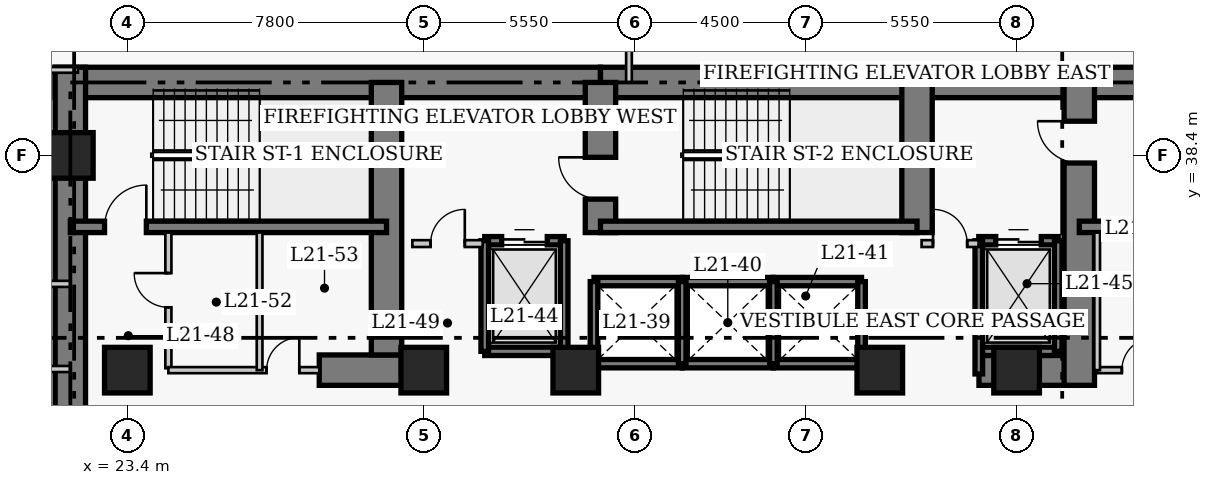
"""IFC4 building model, lengths in metres.
Left out: names, types, materials, properties, quantities, classifications, styles, units other than length and angle.
Written with IfcOpenShell. Run it as: python <this file> out.ifc"""

import sys

from ifc_helpers import new_model, si_unit, direction, frame, frame_2d, origin, origin_2d, place, context, subcontext, project, spatial, rectangle, extrude, element, fill, save


model = new_model("IFC4")
c1 = context("Model", 3, precision=1e-05, world=origin(), true_north=direction((0.0, 1.0)))
c2 = subcontext(c1, "Body", "Model", "MODEL_VIEW")
j1 = project(units=[si_unit("LENGTHUNIT", "METRE"), si_unit("PLANEANGLEUNIT", "RADIAN")], contexts=[c1])
p1 = place(None, origin())
s1 = spatial("IfcSite", under=j1, at=p1, CompositionType="ELEMENT")
p2 = place(p1, origin())
s2 = spatial("IfcBuilding", under=s1, at=p2, CompositionType="ELEMENT")
p3 = place(p2, frame((0.0, 0.0, 88.0)))
s3 = spatial("IfcBuildingStorey", under=s2, at=p3, CompositionType="ELEMENT", Elevation=88.0)
p4 = place(p3, frame((21.5, 40.32, 0.0), z_axis=(0.0, 0.0, 1.0), x_axis=(1.0, 0.0, 0.0)))
e1 = element("IfcWall", 1, at=p4, inside=s3, PredefinedType="SHEAR", context=c2, shape_type="SweptSolid", body=[
    extrude(rectangle(XDim=14.35, YDim=0.8, at=frame_2d((7.175, 0.0))), origin(), (0.0, 0.0, 1.0), 3.8),
])
p5 = place(p3, frame((35.85, 40.32, 0.0), z_axis=(0.0, 0.0, 1.0), x_axis=(1.0, 0.0, 0.0)))
e2 = element("IfcWall", 2, at=p5, inside=s3, PredefinedType="SHEAR", context=c2, shape_type="SweptSolid", body=[
    extrude(rectangle(XDim=12.6, YDim=0.8, at=frame_2d((6.3, 0.0))), origin(), (0.0, 0.0, 1.0), 3.8),
])
p6 = place(p3, frame((48.45, 40.32, 0.0), z_axis=(0.0, 0.0, 1.0), x_axis=(1.0, 0.0, 0.0)))
e3 = element("IfcWall", 3, at=p6, inside=s3, PredefinedType="SHEAR", context=c2, shape_type="SweptSolid", body=[
    extrude(rectangle(XDim=8.87, YDim=0.8, at=frame_2d((4.435, 0.0))), origin(), (0.0, 0.0, 1.0), 3.8),
])
p7 = place(p3, frame((21.9, 27.05, 0.0), z_axis=(0.0, 0.0, 1.0), x_axis=(0.0, 1.0, 0.0)))
e4 = element("IfcWall", 4, at=p7, inside=s3, PredefinedType="SHEAR", context=c2, shape_type="SweptSolid", body=[
    extrude(rectangle(XDim=13.67, YDim=0.8, at=frame_2d((6.835, 0.0))), origin(), (0.0, 0.0, 1.0), 3.8),
])
p8 = place(p3, frame((28.45, 32.75, 0.0), z_axis=(0.0, 0.0, 1.0), x_axis=(1.0, 0.0, 0.0)))
e5 = element("IfcWall", 5, at=p8, inside=s3, PredefinedType="SHEAR", context=c2, shape_type="SweptSolid", body=[
    extrude(rectangle(XDim=2.4, YDim=0.8, at=frame_2d((1.2, 0.0))), origin(), (0.0, 0.0, 1.0), 3.8),
])
p9 = place(p3, frame((45.81, 32.75, 0.0), z_axis=(0.0, 0.0, 1.0), x_axis=(1.0, 0.0, 0.0)))
e6 = element("IfcWall", 6, at=p9, inside=s3, PredefinedType="SHEAR", context=c2, shape_type="SweptSolid", body=[
    extrude(rectangle(XDim=2.64, YDim=0.8, at=frame_2d((1.32, 0.0))), origin(), (0.0, 0.0, 1.0), 3.8),
])
p10 = place(p3, frame((30.22, 33.15, 0.0), z_axis=(0.0, 0.0, 1.0), x_axis=(0.0, 1.0, 0.0)))
e7 = element("IfcWall", 7, at=p10, inside=s3, PredefinedType="SHEAR", context=c2, shape_type="SweptSolid", body=[
    extrude(rectangle(XDim=7.17, YDim=0.8, at=frame_2d((3.585, 0.0))), origin(), (0.0, 0.0, 1.0), 3.8),
])
p11 = place(p3, frame((35.85, 36.37, 0.0), z_axis=(0.0, 0.0, 1.0), x_axis=(0.0, 1.0, 0.0)))
e8 = element("IfcWall", 8, at=p11, inside=s3, PredefinedType="SHEAR", context=c2, shape_type="SweptSolid", body=[
    extrude(rectangle(XDim=3.95, YDim=0.8, at=frame_2d((1.975, 0.0))), origin(), (0.0, 0.0, 1.0), 3.8),
])
p12 = place(p11, frame((0.88, 0.0, 0.0)))
e9 = element("IfcOpeningElement", 9, at=p12, cuts=e8, PredefinedType="OPENING", context=c2, shape_type="SweptSolid", body=[
    extrude(rectangle(XDim=1.1, YDim=2.15, at=frame_2d((0.55, 1.075))), frame((0.0, 0.41, 0.0), z_axis=(0.0, -1.0, 0.0), x_axis=(1.0, 0.0, 0.0)), (0.0, 0.0, 1.0), 0.82),
])
p13 = place(p3, frame((44.18, 36.37, 0.0), z_axis=(0.0, 0.0, 1.0), x_axis=(0.0, 1.0, 0.0)))
e10 = element("IfcWall", 10, at=p13, inside=s3, PredefinedType="SHEAR", context=c2, shape_type="SweptSolid", body=[
    extrude(rectangle(XDim=3.95, YDim=0.8, at=frame_2d((1.975, 0.0))), origin(), (0.0, 0.0, 1.0), 3.8),
])
p14 = place(p3, frame((48.45, 32.35, 0.0), z_axis=(0.0, 0.0, 1.0), x_axis=(0.0, 1.0, 0.0)))
e11 = element("IfcWall", 11, at=p14, inside=s3, PredefinedType="SHEAR", context=c2, shape_type="SweptSolid", body=[
    extrude(rectangle(XDim=7.97, YDim=0.8, at=frame_2d((3.985, 0.0))), origin(), (0.0, 0.0, 1.0), 3.8),
])
p15 = place(p14, frame((5.85, 0.0, 0.0)))
e12 = element("IfcOpeningElement", 12, at=p15, cuts=e11, PredefinedType="OPENING", context=c2, shape_type="SweptSolid", body=[
    extrude(rectangle(XDim=1.1, YDim=2.15, at=frame_2d((0.55, 1.075))), frame((0.0, 0.41, 0.0), z_axis=(0.0, -1.0, 0.0), x_axis=(1.0, 0.0, 0.0)), (0.0, 0.0, 1.0), 0.82),
])
p16 = place(p3, frame((21.9, 36.52, 0.0), z_axis=(0.0, 0.0, 1.0), x_axis=(1.0, 0.0, 0.0)))
e13 = element("IfcWall", 13, at=p16, inside=s3, PredefinedType="SHEAR", context=c2, shape_type="SweptSolid", body=[
    extrude(rectangle(XDim=8.32, YDim=0.3, at=frame_2d((4.16, 0.0))), origin(), (0.0, 0.0, 1.0), 3.8),
])
p17 = place(p16, frame((0.9, 0.0, 0.0)))
e14 = element("IfcOpeningElement", 14, at=p17, cuts=e13, PredefinedType="OPENING", context=c2, shape_type="SweptSolid", body=[
    extrude(rectangle(XDim=1.1, YDim=2.15, at=frame_2d((0.55, 1.075))), frame((0.0, 0.16, 0.0), z_axis=(0.0, -1.0, 0.0), x_axis=(1.0, 0.0, 0.0)), (0.0, 0.0, 1.0), 0.32),
])
p18 = place(p3, frame((35.85, 36.52, 0.0), z_axis=(0.0, 0.0, 1.0), x_axis=(1.0, 0.0, 0.0)))
e15 = element("IfcWall", 15, at=p18, inside=s3, PredefinedType="SHEAR", context=c2, shape_type="SweptSolid", body=[
    extrude(rectangle(XDim=8.33, YDim=0.3, at=frame_2d((4.165, 0.0))), origin(), (0.0, 0.0, 1.0), 3.8),
])
p19 = place(p3, frame((48.45, 36.52, 0.0), z_axis=(0.0, 0.0, 1.0), x_axis=(1.0, 0.0, 0.0)))
e16 = element("IfcWall", 16, at=p19, inside=s3, PredefinedType="SHEAR", context=c2, shape_type="SweptSolid", body=[
    extrude(rectangle(XDim=8.47, YDim=0.3, at=frame_2d((4.235, 0.0))), origin(), (0.0, 0.0, 1.0), 3.8),
])
for number, where, z_axis, x_axis in (
    (17, (21.9, 38.4, 0.0), (0.0, 0.0, 1.0), (1.0, 0.0, 0.0)),
    (18, (23.4, 32.75, 0.0), (0.0, 0.0, 1.0), (1.0, 0.0, 0.0)),
    (19, (31.2, 32.75, 0.0), (0.0, 0.0, 1.0), (1.0, 0.0, 0.0)),
    (20, (35.2, 32.75, 0.0), (0.0, 0.0, 1.0), (1.0, 0.0, 0.0)),
    (21, (43.2, 32.75, 0.0), (0.0, 0.0, 1.0), (1.0, 0.0, 0.0)),
    (22, (46.8, 32.75, 0.0), (0.0, 0.0, 1.0), (1.0, 0.0, 0.0)),
):
    element("IfcColumn", number, at=place(p3, frame(where, z_axis=z_axis, x_axis=x_axis)), inside=s3, PredefinedType="COLUMN", context=c2, shape_type="SweptSolid", body=[
        extrude(rectangle(XDim=1.2, YDim=1.2, at=origin_2d()), origin(), (0.0, 0.0, 1.0), 3.8),
    ])
for number, where, z_axis, x_axis in (
    (23, (35.68, 35.08, 0.0), (0.0, 0.0, 1.0), (1.0, 0.0, 0.0)),
    (24, (35.68, 32.92, 0.0), (0.0, 0.0, 1.0), (1.0, 0.0, 0.0)),
):
    element("IfcWall", number, at=place(p3, frame(where, z_axis=z_axis, x_axis=x_axis)), inside=s3, PredefinedType="SHEAR", context=c2, shape_type="SweptSolid", body=[
        extrude(rectangle(XDim=2.32, YDim=0.22, at=frame_2d((1.16, 0.0))), origin(), (0.0, 0.0, 1.0), 3.8),
    ])
p20 = place(p3, frame((35.68, 32.92, 0.0), z_axis=(0.0, 0.0, 1.0), x_axis=(0.0, 1.0, 0.0)))
e25 = element("IfcWall", 25, at=p20, inside=s3, PredefinedType="SHEAR", context=c2, shape_type="SweptSolid", body=[
    extrude(rectangle(XDim=2.16, YDim=0.2, at=frame_2d((1.08, 0.0))), origin(), (0.0, 0.0, 1.0), 3.8),
])
for number, where, z_axis, x_axis in (
    (26, (38.0, 35.08, 0.0), (0.0, 0.0, 1.0), (1.0, 0.0, 0.0)),
    (27, (38.0, 32.92, 0.0), (0.0, 0.0, 1.0), (1.0, 0.0, 0.0)),
):
    element("IfcWall", number, at=place(p3, frame(where, z_axis=z_axis, x_axis=x_axis)), inside=s3, PredefinedType="SHEAR", context=c2, shape_type="SweptSolid", body=[
        extrude(rectangle(XDim=2.4, YDim=0.22, at=frame_2d((1.2, 0.0))), origin(), (0.0, 0.0, 1.0), 3.8),
    ])
p21 = place(p3, frame((38.0, 32.92, 0.0), z_axis=(0.0, 0.0, 1.0), x_axis=(0.0, 1.0, 0.0)))
e28 = element("IfcWall", 28, at=p21, inside=s3, PredefinedType="SHEAR", context=c2, shape_type="SweptSolid", body=[
    extrude(rectangle(XDim=2.16, YDim=0.2, at=frame_2d((1.08, 0.0))), origin(), (0.0, 0.0, 1.0), 3.8),
])
for number, where, z_axis, x_axis in (
    (29, (40.4, 35.08, 0.0), (0.0, 0.0, 1.0), (1.0, 0.0, 0.0)),
    (30, (40.4, 32.92, 0.0), (0.0, 0.0, 1.0), (1.0, 0.0, 0.0)),
):
    element("IfcWall", number, at=place(p3, frame(where, z_axis=z_axis, x_axis=x_axis)), inside=s3, PredefinedType="SHEAR", context=c2, shape_type="SweptSolid", body=[
        extrude(rectangle(XDim=2.32, YDim=0.22, at=frame_2d((1.16, 0.0))), origin(), (0.0, 0.0, 1.0), 3.8),
    ])
for number, where, z_axis, x_axis in (
    (31, (40.4, 32.92, 0.0), (0.0, 0.0, 1.0), (0.0, 1.0, 0.0)),
    (32, (42.72, 32.92, 0.0), (0.0, 0.0, 1.0), (0.0, 1.0, 0.0)),
):
    element("IfcWall", number, at=place(p3, frame(where, z_axis=z_axis, x_axis=x_axis)), inside=s3, PredefinedType="SHEAR", context=c2, shape_type="SweptSolid", body=[
        extrude(rectangle(XDim=2.16, YDim=0.2, at=frame_2d((1.08, 0.0))), origin(), (0.0, 0.0, 1.0), 3.8),
    ])
p22 = place(p3, frame((32.805, 36.155, 0.0), z_axis=(0.0, 0.0, 1.0), x_axis=(1.0, 0.0, 0.0)))
e33 = element("IfcWall", 33, at=p22, inside=s3, PredefinedType="SHEAR", context=c2, shape_type="SweptSolid", body=[
    extrude(rectangle(XDim=2.09, YDim=0.22, at=frame_2d((1.045, 0.0))), origin(), (0.0, 0.0, 1.0), 3.8),
])
p23 = place(p22, frame((0.445, 0.0, 0.0)))
e34 = element("IfcOpeningElement", 34, at=p23, cuts=e33, PredefinedType="OPENING", context=c2, shape_type="SweptSolid", body=[
    extrude(rectangle(XDim=1.2, YDim=2.15, at=frame_2d((0.6, 1.075))), frame((0.0, 0.12, 0.0), z_axis=(0.0, -1.0, 0.0), x_axis=(1.0, 0.0, 0.0)), (0.0, 0.0, 1.0), 0.24),
])
p24 = place(p3, frame((32.805, 33.245, 0.0), z_axis=(0.0, 0.0, 1.0), x_axis=(1.0, 0.0, 0.0)))
e35 = element("IfcWall", 35, at=p24, inside=s3, PredefinedType="SHEAR", context=c2, shape_type="SweptSolid", body=[
    extrude(rectangle(XDim=2.09, YDim=0.22, at=frame_2d((1.045, 0.0))), origin(), (0.0, 0.0, 1.0), 3.8),
])
for number, where, z_axis, x_axis in (
    (36, (32.805, 33.245, 0.0), (0.0, 0.0, 1.0), (0.0, 1.0, 0.0)),
    (37, (34.895, 33.245, 0.0), (0.0, 0.0, 1.0), (0.0, 1.0, 0.0)),
):
    element("IfcWall", number, at=place(p3, frame(where, z_axis=z_axis, x_axis=x_axis)), inside=s3, PredefinedType="SHEAR", context=c2, shape_type="SweptSolid", body=[
        extrude(rectangle(XDim=2.91, YDim=0.2, at=frame_2d((1.455, 0.0))), origin(), (0.0, 0.0, 1.0), 3.8),
    ])
p25 = place(p3, frame((45.805, 36.155, 0.0), z_axis=(0.0, 0.0, 1.0), x_axis=(1.0, 0.0, 0.0)))
e38 = element("IfcWall", 38, at=p25, inside=s3, PredefinedType="SHEAR", context=c2, shape_type="SweptSolid", body=[
    extrude(rectangle(XDim=2.09, YDim=0.22, at=frame_2d((1.045, 0.0))), origin(), (0.0, 0.0, 1.0), 3.8),
])
p26 = place(p25, frame((0.445, 0.0, 0.0)))
e39 = element("IfcOpeningElement", 39, at=p26, cuts=e38, PredefinedType="OPENING", context=c2, shape_type="SweptSolid", body=[
    extrude(rectangle(XDim=1.2, YDim=2.15, at=frame_2d((0.6, 1.075))), frame((0.0, 0.12, 0.0), z_axis=(0.0, -1.0, 0.0), x_axis=(1.0, 0.0, 0.0)), (0.0, 0.0, 1.0), 0.24),
])
p27 = place(p3, frame((45.805, 33.245, 0.0), z_axis=(0.0, 0.0, 1.0), x_axis=(1.0, 0.0, 0.0)))
e40 = element("IfcWall", 40, at=p27, inside=s3, PredefinedType="SHEAR", context=c2, shape_type="SweptSolid", body=[
    extrude(rectangle(XDim=2.09, YDim=0.22, at=frame_2d((1.045, 0.0))), origin(), (0.0, 0.0, 1.0), 3.8),
])
p28 = place(p3, frame((45.805, 32.65, 0.0), z_axis=(0.0, 0.0, 1.0), x_axis=(0.0, 1.0, 0.0)))
e41 = element("IfcWall", 41, at=p28, inside=s3, PredefinedType="SHEAR", context=c2, shape_type="SweptSolid", body=[
    extrude(rectangle(XDim=3.505, YDim=0.2, at=frame_2d((1.752, 0.0))), origin(), (0.0, 0.0, 1.0), 3.8),
])
p29 = place(p3, frame((47.895, 33.245, 0.0), z_axis=(0.0, 0.0, 1.0), x_axis=(0.0, 1.0, 0.0)))
e42 = element("IfcWall", 42, at=p29, inside=s3, PredefinedType="SHEAR", context=c2, shape_type="SweptSolid", body=[
    extrude(rectangle(XDim=2.91, YDim=0.2, at=frame_2d((1.455, 0.0))), origin(), (0.0, 0.0, 1.0), 3.8),
])
p30 = place(p3, frame((30.9, 36.08, 0.0), z_axis=(0.0, 0.0, 1.0), x_axis=(1.0, 0.0, 0.0)))
e43 = element("IfcWall", 43, at=p30, inside=s3, PredefinedType="PARTITIONING", context=c2, shape_type="SweptSolid", body=[
    extrude(rectangle(XDim=1.85, YDim=0.18, at=frame_2d((0.925, 0.0))), origin(), (0.0, 0.0, 1.0), 3.54),
])
p31 = place(p30, frame((0.48, 0.0, 0.0)))
e44 = element("IfcOpeningElement", 44, at=p31, cuts=e43, PredefinedType="OPENING", context=c2, shape_type="SweptSolid", body=[
    extrude(rectangle(XDim=0.9, YDim=2.15, at=frame_2d((0.45, 1.075))), frame((0.0, 0.1, 0.0), z_axis=(0.0, -1.0, 0.0), x_axis=(1.0, 0.0, 0.0)), (0.0, 0.0, 1.0), 0.2),
])
p32 = place(p3, frame((44.3, 36.08, 0.0), z_axis=(0.0, 0.0, 1.0), x_axis=(1.0, 0.0, 0.0)))
e45 = element("IfcWall", 45, at=p32, inside=s3, PredefinedType="PARTITIONING", context=c2, shape_type="SweptSolid", body=[
    extrude(rectangle(XDim=1.5, YDim=0.18, at=frame_2d((0.75, 0.0))), origin(), (0.0, 0.0, 1.0), 3.54),
])
p33 = place(p32, frame((0.3, 0.0, 0.0)))
e46 = element("IfcOpeningElement", 46, at=p33, cuts=e45, PredefinedType="OPENING", context=c2, shape_type="SweptSolid", body=[
    extrude(rectangle(XDim=0.9, YDim=2.15, at=frame_2d((0.45, 1.075))), frame((0.0, 0.1, 0.0), z_axis=(0.0, -1.0, 0.0), x_axis=(1.0, 0.0, 0.0)), (0.0, 0.0, 1.0), 0.2),
])
p34 = place(p3, frame((24.48, 32.8, 0.0), z_axis=(0.0, 0.0, 1.0), x_axis=(0.0, 1.0, 0.0)))
e47 = element("IfcWall", 47, at=p34, inside=s3, PredefinedType="PARTITIONING", context=c2, shape_type="SweptSolid", body=[
    extrude(rectangle(XDim=3.57, YDim=0.16, at=frame_2d((1.785, 0.0))), origin(), (0.0, 0.0, 1.0), 3.54),
])
p35 = place(p34, frame((1.604, 0.0, 0.0)))
e48 = element("IfcOpeningElement", 48, at=p35, cuts=e47, PredefinedType="OPENING", context=c2, shape_type="SweptSolid", body=[
    extrude(rectangle(XDim=0.9, YDim=2.1, at=frame_2d((0.45, 1.05))), frame((0.0, 0.09, 0.0), z_axis=(0.0, -1.0, 0.0), x_axis=(1.0, 0.0, 0.0)), (0.0, 0.0, 1.0), 0.18),
])
p36 = place(p3, frame((24.48, 32.75, 0.0), z_axis=(0.0, 0.0, 1.0), x_axis=(1.0, 0.0, 0.0)))
e49 = element("IfcWall", 49, at=p36, inside=s3, PredefinedType="PARTITIONING", context=c2, shape_type="SweptSolid", body=[
    extrude(rectangle(XDim=3.97, YDim=0.16, at=frame_2d((1.985, 0.0))), origin(), (0.0, 0.0, 1.0), 3.54),
])
p37 = place(p36, frame((2.585, 0.0, 0.0)))
e50 = element("IfcOpeningElement", 50, at=p37, cuts=e49, PredefinedType="OPENING", context=c2, shape_type="SweptSolid", body=[
    extrude(rectangle(XDim=0.86, YDim=2.05, at=frame_2d((0.43, 1.025))), frame((0.0, 0.09, 0.0), z_axis=(0.0, -1.0, 0.0), x_axis=(1.0, 0.0, 0.0)), (0.0, 0.0, 1.0), 0.18),
])
p38 = place(p3, frame((48.92, 32.75, 0.0), z_axis=(0.0, 0.0, 1.0), x_axis=(1.0, 0.0, 0.0)))
e51 = element("IfcWall", 51, at=p38, inside=s3, PredefinedType="PARTITIONING", context=c2, shape_type="SweptSolid", body=[
    extrude(rectangle(XDim=2.2, YDim=0.16, at=frame_2d((1.1, 0.0))), origin(), (0.0, 0.0, 1.0), 3.54),
])
p39 = place(p38, frame((0.65, 0.0, 0.0)))
e52 = element("IfcOpeningElement", 52, at=p39, cuts=e51, PredefinedType="OPENING", context=c2, shape_type="SweptSolid", body=[
    extrude(rectangle(XDim=0.86, YDim=2.05, at=frame_2d((0.43, 1.025))), frame((0.0, 0.09, 0.0), z_axis=(0.0, -1.0, 0.0), x_axis=(1.0, 0.0, 0.0)), (0.0, 0.0, 1.0), 0.18),
])
for number, where, z_axis, x_axis in (
    (53, (48.92, 32.75, 0.0), (0.0, 0.0, 1.0), (0.0, 1.0, 0.0)),
    (54, (26.88, 32.75, 0.0), (0.0, 0.0, 1.0), (0.0, 1.0, 0.0)),
):
    element("IfcWall", number, at=place(p3, frame(where, z_axis=z_axis, x_axis=x_axis)), inside=s3, PredefinedType="PARTITIONING", context=c2, shape_type="SweptSolid", body=[
        extrude(rectangle(XDim=3.62, YDim=0.15, at=frame_2d((1.81, 0.0))), origin(), (0.0, 0.0, 1.0), 3.54),
    ])
for number, where, z_axis, x_axis in (
    (55, (18.86, 35.02, 0.0), (0.0, 0.0, 1.0), (1.0, 0.0, 0.0)),
    (56, (18.86, 32.78, 0.0), (0.0, 0.0, 1.0), (1.0, 0.0, 0.0)),
):
    element("IfcWall", number, at=place(p3, frame(where, z_axis=z_axis, x_axis=x_axis)), inside=s3, PredefinedType="PARTITIONING", context=c2, shape_type="SweptSolid", body=[
        extrude(rectangle(XDim=3.04, YDim=0.16, at=frame_2d((1.52, 0.0))), origin(), (0.0, 0.0, 1.0), 3.54),
    ])
p40 = place(p3, frame((16.64, 40.65, 0.0), z_axis=(0.0, 0.0, 1.0), x_axis=(1.0, 0.0, 0.0)))
e57 = element("IfcWall", 57, at=p40, inside=s3, PredefinedType="PARTITIONING", context=c2, shape_type="SweptSolid", body=[
    extrude(rectangle(XDim=5.46, YDim=0.15, at=frame_2d((2.73, 0.0))), origin(), (0.0, 0.0, 1.0), 3.54),
])
p41 = place(p40, frame((0.55, 0.0, 0.0)))
e58 = element("IfcOpeningElement", 58, at=p41, cuts=e57, PredefinedType="OPENING", context=c2, shape_type="SweptSolid", body=[
    extrude(rectangle(XDim=1.0, YDim=2.15, at=frame_2d((0.5, 1.075))), frame((0.0, 0.085, 0.0), z_axis=(0.0, -1.0, 0.0), x_axis=(1.0, 0.0, 0.0)), (0.0, 0.0, 1.0), 0.17),
])
p42 = place(p3, frame((36.6, 40.32, 0.0), z_axis=(0.0, 0.0, 1.0), x_axis=(0.0, 1.0, 0.0)))
e59 = element("IfcWall", 59, at=p42, inside=s3, PredefinedType="PARTITIONING", context=c2, shape_type="SweptSolid", body=[
    extrude(rectangle(XDim=3.445, YDim=0.15, at=frame_2d((1.723, 0.0))), origin(), (0.0, 0.0, 1.0), 3.54),
])
p43 = place(p23, origin())
e60 = element("IfcDoor", 60, at=p43, inside=s3, OperationType="DOUBLE_DOOR_SLIDING", PredefinedType="DOOR", context=c2, shape_type="SweptSolid", body=[
    extrude(rectangle(XDim=1.2, YDim=2.15, at=frame_2d((0.6, 1.075))), frame((0.0, 0.025, 0.0), z_axis=(0.0, -1.0, 0.0), x_axis=(1.0, 0.0, 0.0)), (0.0, 0.0, 1.0), 0.05),
])
fill(e34, e60)
p44 = place(p26, origin())
e61 = element("IfcDoor", 61, at=p44, inside=s3, OperationType="DOUBLE_DOOR_SLIDING", PredefinedType="DOOR", context=c2, shape_type="SweptSolid", body=[
    extrude(rectangle(XDim=1.2, YDim=2.15, at=frame_2d((0.6, 1.075))), frame((0.0, 0.025, 0.0), z_axis=(0.0, -1.0, 0.0), x_axis=(1.0, 0.0, 0.0)), (0.0, 0.0, 1.0), 0.05),
])
fill(e39, e61)
p45 = place(p31, origin())
e62 = element("IfcDoor", 62, at=p45, inside=s3, OperationType="SINGLE_SWING_RIGHT", PredefinedType="DOOR", context=c2, shape_type="SweptSolid", body=[
    extrude(rectangle(XDim=0.9, YDim=2.15, at=frame_2d((0.45, 1.075))), frame((0.0, 0.025, 0.0), z_axis=(0.0, -1.0, 0.0), x_axis=(1.0, 0.0, 0.0)), (0.0, 0.0, 1.0), 0.05),
])
fill(e44, e62)
p46 = place(p33, origin())
e63 = element("IfcDoor", 63, at=p46, inside=s3, OperationType="SINGLE_SWING_LEFT", PredefinedType="DOOR", context=c2, shape_type="SweptSolid", body=[
    extrude(rectangle(XDim=0.9, YDim=2.15, at=frame_2d((0.45, 1.075))), frame((0.0, 0.025, 0.0), z_axis=(0.0, -1.0, 0.0), x_axis=(1.0, 0.0, 0.0)), (0.0, 0.0, 1.0), 0.05),
])
fill(e46, e63)
p47 = place(p35, origin())
e64 = element("IfcDoor", 64, at=p47, inside=s3, OperationType="SINGLE_SWING_RIGHT", PredefinedType="DOOR", context=c2, shape_type="SweptSolid", body=[
    extrude(rectangle(XDim=0.9, YDim=2.1, at=frame_2d((0.45, 1.05))), frame((0.0, 0.025, 0.0), z_axis=(0.0, -1.0, 0.0), x_axis=(1.0, 0.0, 0.0)), (0.0, 0.0, 1.0), 0.05),
])
fill(e48, e64)
p48 = place(p37, origin())
e65 = element("IfcDoor", 65, at=p48, inside=s3, OperationType="SINGLE_SWING_RIGHT", PredefinedType="DOOR", context=c2, shape_type="SweptSolid", body=[
    extrude(rectangle(XDim=0.86, YDim=2.05, at=frame_2d((0.43, 1.025))), frame((0.0, 0.025, 0.0), z_axis=(0.0, -1.0, 0.0), x_axis=(1.0, 0.0, 0.0)), (0.0, 0.0, 1.0), 0.05),
])
fill(e50, e65)
p49 = place(p39, origin())
e66 = element("IfcDoor", 66, at=p49, inside=s3, OperationType="SINGLE_SWING_RIGHT", PredefinedType="DOOR", context=c2, shape_type="SweptSolid", body=[
    extrude(rectangle(XDim=0.86, YDim=2.05, at=frame_2d((0.43, 1.025))), frame((0.0, 0.025, 0.0), z_axis=(0.0, -1.0, 0.0), x_axis=(1.0, 0.0, 0.0)), (0.0, 0.0, 1.0), 0.05),
])
fill(e52, e66)
p50 = place(p17, origin())
e67 = element("IfcDoor", 67, at=p50, inside=s3, OperationType="SINGLE_SWING_RIGHT", PredefinedType="DOOR", context=c2, shape_type="SweptSolid", body=[
    extrude(rectangle(XDim=1.1, YDim=2.15, at=frame_2d((0.55, 1.075))), frame((0.0, 0.025, 0.0), z_axis=(0.0, -1.0, 0.0), x_axis=(1.0, 0.0, 0.0)), (0.0, 0.0, 1.0), 0.05),
])
fill(e14, e67)
p51 = place(p12, origin())
e68 = element("IfcDoor", 68, at=p51, inside=s3, OperationType="SINGLE_SWING_RIGHT", PredefinedType="DOOR", context=c2, shape_type="SweptSolid", body=[
    extrude(rectangle(XDim=1.1, YDim=2.15, at=frame_2d((0.55, 1.075))), frame((0.0, 0.025, 0.0), z_axis=(0.0, -1.0, 0.0), x_axis=(1.0, 0.0, 0.0)), (0.0, 0.0, 1.0), 0.05),
])
fill(e9, e68)
p52 = place(p15, origin())
e69 = element("IfcDoor", 69, at=p52, inside=s3, OperationType="SINGLE_SWING_RIGHT", PredefinedType="DOOR", context=c2, shape_type="SweptSolid", body=[
    extrude(rectangle(XDim=1.1, YDim=2.15, at=frame_2d((0.55, 1.075))), frame((0.0, 0.025, 0.0), z_axis=(0.0, -1.0, 0.0), x_axis=(1.0, 0.0, 0.0)), (0.0, 0.0, 1.0), 0.05),
])
fill(e12, e69)
save(model, sys.argv[1])
